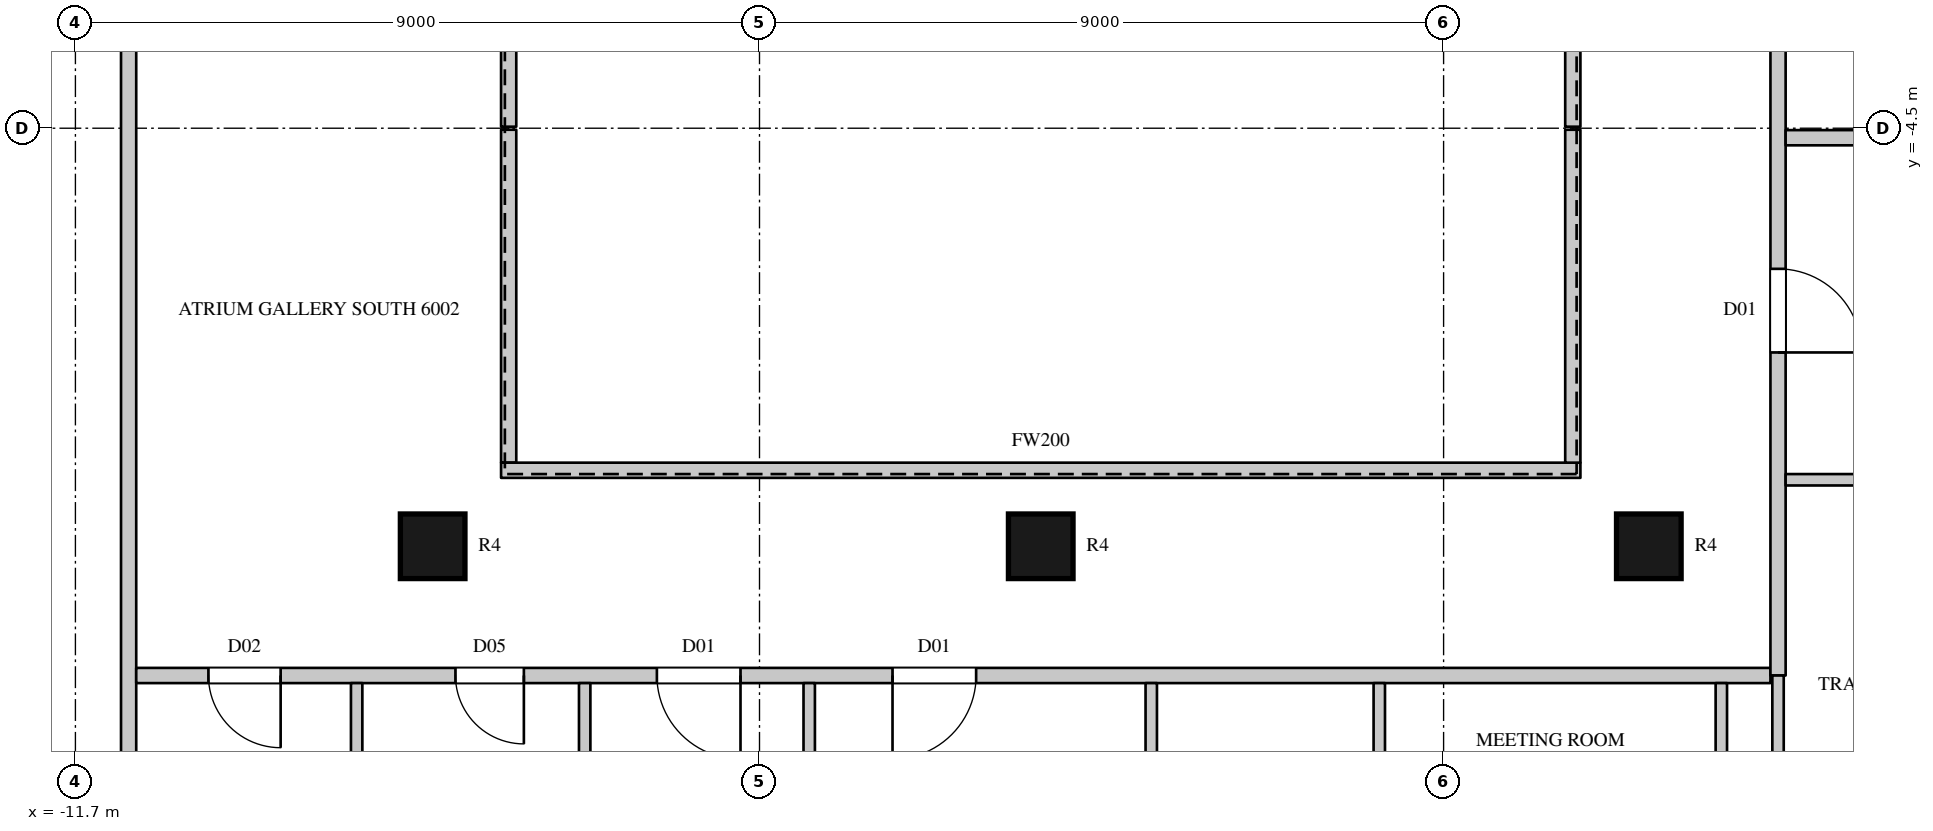
"""IFC4 building model, lengths in metres.
Left out: names, types, materials, properties, quantities, classifications, styles, units other than length and angle.
Written with IfcOpenShell. Run it as: python <this file> out.ifc"""

import sys

from ifc_helpers import new_model, si_unit, direction, frame, frame_2d, origin, origin_2d, place, context, subcontext, project, spatial, rectangle, circle, extrude, element, fill, save


model = new_model("IFC4")
c1 = context("Model", 3, precision=1e-05, world=origin(), true_north=direction((0.0, 1.0)))
c2 = subcontext(c1, "Body", "Model", "MODEL_VIEW")
j1 = project(units=[si_unit("LENGTHUNIT", "METRE"), si_unit("PLANEANGLEUNIT", "RADIAN")], contexts=[c1])
p1 = place(None, origin())
s1 = spatial("IfcSite", under=j1, at=p1, CompositionType="ELEMENT")
p2 = place(p1, origin())
s2 = spatial("IfcBuilding", under=s1, at=p2, CompositionType="ELEMENT")
p3 = place(p2, frame((0.0, 0.0, 268.0)))
s3 = spatial("IfcBuildingStorey", under=s2, at=p3, CompositionType="ELEMENT", Elevation=268.0)
for number, where, z_axis, x_axis in (
    (1, (-7.0, -10.0, 0.0), (0.0, 0.0, 1.0), (1.0, 0.0, 0.0)),
    (2, (1.0, -10.0, 0.0), (0.0, 0.0, 1.0), (1.0, 0.0, 0.0)),
    (3, (9.0, -10.0, 0.0), (0.0, 0.0, 1.0), (1.0, 0.0, 0.0)),
):
    element("IfcColumn", number, at=place(p3, frame(where, z_axis=z_axis, x_axis=x_axis)), inside=s3, PredefinedType="COLUMN", context=c2, shape_type="SweptSolid", body=[
        extrude(circle(Radius=0.425, at=origin_2d()), origin(), (0.0, 0.0, 1.0), 4.1),
    ])
p4 = place(p3, frame((-11.0, -14.8, 0.0), z_axis=(0.0, 0.0, 1.0), x_axis=(0.0, 1.0, 0.0)))
e4 = element("IfcWall", 4, at=p4, inside=s3, PredefinedType="PARTITIONING", context=c2, shape_type="SweptSolid", body=[
    extrude(rectangle(XDim=29.5, YDim=0.2, at=frame_2d((14.75, 0.0))), origin(), (0.0, 0.0, 1.0), 3.8),
])
p5 = place(p4, frame((17.9, 0.0, 0.0)))
e5 = element("IfcOpeningElement", 5, at=p5, cuts=e4, PredefinedType="OPENING", context=c2, shape_type="SweptSolid", body=[
    extrude(rectangle(XDim=1.5, YDim=2.4, at=frame_2d((0.75, 1.2))), frame((0.0, 0.11, 0.0), z_axis=(0.0, -1.0, 0.0), x_axis=(1.0, 0.0, 0.0)), (0.0, 0.0, 1.0), 0.22),
])
p6 = place(p3, frame((-10.9, -11.7, 0.0), z_axis=(0.0, 0.0, 1.0), x_axis=(1.0, 0.0, 0.0)))
e6 = element("IfcWall", 6, at=p6, inside=s3, PredefinedType="PARTITIONING", context=c2, shape_type="SweptSolid", body=[
    extrude(rectangle(XDim=21.5, YDim=0.2, at=frame_2d((10.75, 0.0))), origin(), (0.0, 0.0, 1.0), 3.8),
])
p7 = place(p6, frame((0.95, 0.0, 0.0)))
e7 = element("IfcOpeningElement", 7, at=p7, cuts=e6, PredefinedType="OPENING", context=c2, shape_type="SweptSolid", body=[
    extrude(rectangle(XDim=0.95, YDim=2.2, at=frame_2d((0.475, 1.1))), frame((0.0, 0.11, 0.0), z_axis=(0.0, -1.0, 0.0), x_axis=(1.0, 0.0, 0.0)), (0.0, 0.0, 1.0), 0.22),
])
p8 = place(p6, frame((4.2, 0.0, 0.0)))
e8 = element("IfcOpeningElement", 8, at=p8, cuts=e6, PredefinedType="OPENING", context=c2, shape_type="SweptSolid", body=[
    extrude(rectangle(XDim=0.9, YDim=2.2, at=frame_2d((0.45, 1.1))), frame((0.0, 0.11, 0.0), z_axis=(0.0, -1.0, 0.0), x_axis=(1.0, 0.0, 0.0)), (0.0, 0.0, 1.0), 0.22),
])
p9 = place(p6, frame((6.85, 0.0, 0.0)))
e9 = element("IfcOpeningElement", 9, at=p9, cuts=e6, PredefinedType="OPENING", context=c2, shape_type="SweptSolid", body=[
    extrude(rectangle(XDim=1.1, YDim=2.4, at=frame_2d((0.55, 1.2))), frame((0.0, 0.11, 0.0), z_axis=(0.0, -1.0, 0.0), x_axis=(1.0, 0.0, 0.0)), (0.0, 0.0, 1.0), 0.22),
])
p10 = place(p6, frame((9.95, 0.0, 0.0)))
e10 = element("IfcOpeningElement", 10, at=p10, cuts=e6, PredefinedType="OPENING", context=c2, shape_type="SweptSolid", body=[
    extrude(rectangle(XDim=1.1, YDim=2.4, at=frame_2d((0.55, 1.2))), frame((0.0, 0.11, 0.0), z_axis=(0.0, -1.0, 0.0), x_axis=(1.0, 0.0, 0.0)), (0.0, 0.0, 1.0), 0.22),
])
p11 = place(p3, frame((-6.0, -8.9, 0.0), z_axis=(0.0, 0.0, 1.0), x_axis=(0.0, 1.0, 0.0)))
e11 = element("IfcWall", 11, at=p11, inside=s3, PredefinedType="PARTITIONING", context=c2, shape_type="SweptSolid", body=[
    extrude(rectangle(XDim=4.38, YDim=0.2, at=frame_2d((2.19, 0.0))), origin(), (0.0, 0.0, 1.0), 3.8),
])
p12 = place(p3, frame((-6.1, -9.0, 0.0), z_axis=(0.0, 0.0, 1.0), x_axis=(1.0, 0.0, 0.0)))
e12 = element("IfcWall", 12, at=p12, inside=s3, PredefinedType="PARTITIONING", context=c2, shape_type="SweptSolid", body=[
    extrude(rectangle(XDim=14.2, YDim=0.2, at=frame_2d((7.1, 0.0))), origin(), (0.0, 0.0, 1.0), 3.8),
])
p13 = place(p3, frame((-6.0, -4.48, 0.0), z_axis=(0.0, 0.0, 1.0), x_axis=(0.0, 1.0, 0.0)))
e13 = element("IfcWall", 13, at=p13, inside=s3, PredefinedType="PARTITIONING", context=c2, shape_type="SweptSolid", body=[
    extrude(rectangle(XDim=13.38, YDim=0.2, at=frame_2d((6.69, 0.0))), origin(), (0.0, 0.0, 1.0), 3.8),
])
p14 = place(p3, frame((8.0, -8.9, 0.0), z_axis=(0.0, 0.0, 1.0), x_axis=(0.0, 1.0, 0.0)))
e14 = element("IfcWall", 14, at=p14, inside=s3, PredefinedType="PARTITIONING", context=c2, shape_type="SweptSolid", body=[
    extrude(rectangle(XDim=4.38, YDim=0.2, at=frame_2d((2.19, 0.0))), origin(), (0.0, 0.0, 1.0), 3.8),
])
p15 = place(p3, frame((8.0, -4.48, 0.0), z_axis=(0.0, 0.0, 1.0), x_axis=(0.0, 1.0, 0.0)))
e15 = element("IfcWall", 15, at=p15, inside=s3, PredefinedType="PARTITIONING", context=c2, shape_type="SweptSolid", body=[
    extrude(rectangle(XDim=13.38, YDim=0.2, at=frame_2d((6.69, 0.0))), origin(), (0.0, 0.0, 1.0), 3.8),
])
p16 = place(p3, frame((10.7, -11.7, 0.0), z_axis=(0.0, 0.0, 1.0), x_axis=(0.0, 1.0, 0.0)))
e16 = element("IfcWall", 16, at=p16, inside=s3, PredefinedType="PARTITIONING", context=c2, shape_type="SweptSolid", body=[
    extrude(rectangle(XDim=23.8, YDim=0.2, at=frame_2d((11.9, 0.0))), origin(), (0.0, 0.0, 1.0), 3.8),
])
p17 = place(p16, frame((12.35, 0.0, 0.0)))
e17 = element("IfcOpeningElement", 17, at=p17, cuts=e16, PredefinedType="OPENING", context=c2, shape_type="SweptSolid", body=[
    extrude(rectangle(XDim=1.5, YDim=2.4, at=frame_2d((0.75, 1.2))), frame((0.0, 0.11, 0.0), z_axis=(0.0, -1.0, 0.0), x_axis=(1.0, 0.0, 0.0)), (0.0, 0.0, 1.0), 0.22),
])
p18 = place(p16, frame((19.55, 0.0, 0.0)))
e18 = element("IfcOpeningElement", 18, at=p18, cuts=e16, PredefinedType="OPENING", context=c2, shape_type="SweptSolid", body=[
    extrude(rectangle(XDim=1.1, YDim=2.4, at=frame_2d((0.55, 1.2))), frame((0.0, 0.11, 0.0), z_axis=(0.0, -1.0, 0.0), x_axis=(1.0, 0.0, 0.0)), (0.0, 0.0, 1.0), 0.22),
])
p19 = place(p16, frame((4.25, 0.0, 0.0)))
e19 = element("IfcOpeningElement", 19, at=p19, cuts=e16, PredefinedType="OPENING", context=c2, shape_type="SweptSolid", body=[
    extrude(rectangle(XDim=1.1, YDim=2.4, at=frame_2d((0.55, 1.2))), frame((0.0, 0.11, 0.0), z_axis=(0.0, -1.0, 0.0), x_axis=(1.0, 0.0, 0.0)), (0.0, 0.0, 1.0), 0.22),
])
p20 = place(p3, frame((10.8, -4.625, 0.0), z_axis=(0.0, 0.0, 1.0), x_axis=(1.0, 0.0, 0.0)))
e20 = element("IfcWall", 20, at=p20, inside=s3, PredefinedType="PARTITIONING", context=c2, shape_type="SweptSolid", body=[
    extrude(rectangle(XDim=3.875, YDim=0.2, at=frame_2d((1.938, 0.0))), origin(), (0.0, 0.0, 1.0), 3.8),
])
for number, where, z_axis, x_axis in (
    (21, (-8.0, -24.04, 0.0), (0.0, 0.0, 1.0), (0.0, 1.0, 0.0)),
    (22, (-5.0, -24.04, 0.0), (0.0, 0.0, 1.0), (0.0, 1.0, 0.0)),
):
    element("IfcWall", number, at=place(p3, frame(where, z_axis=z_axis, x_axis=x_axis)), inside=s3, PredefinedType="PARTITIONING", context=c2, shape_type="SweptSolid", body=[
        extrude(rectangle(XDim=12.24, YDim=0.15, at=frame_2d((6.12, 0.0))), origin(), (0.0, 0.0, 1.0), 3.8),
    ])
p21 = place(p3, frame((-2.046, -23.441, 0.0), z_axis=(0.0, 0.0, 1.0), x_axis=(0.0, 1.0, 0.0)))
e23 = element("IfcWall", 23, at=p21, inside=s3, PredefinedType="PARTITIONING", context=c2, shape_type="SweptSolid", body=[
    extrude(rectangle(XDim=11.641, YDim=0.15, at=frame_2d((5.821, 0.0))), origin(), (0.0, 0.0, 1.0), 3.8),
])
p22 = place(p3, frame((2.454, -15.525, 0.0), z_axis=(0.0, 0.0, 1.0), x_axis=(0.0, 1.0, 0.0)))
e24 = element("IfcWall", 24, at=p22, inside=s3, PredefinedType="PARTITIONING", context=c2, shape_type="SweptSolid", body=[
    extrude(rectangle(XDim=3.725, YDim=0.15, at=frame_2d((1.862, 0.0))), origin(), (0.0, 0.0, 1.0), 3.8),
])
p23 = place(p22, frame((1.4, 0.0, 0.0)))
e25 = element("IfcOpeningElement", 25, at=p23, cuts=e24, PredefinedType="OPENING", context=c2, shape_type="SweptSolid", body=[
    extrude(rectangle(XDim=0.95, YDim=2.2, at=frame_2d((0.475, 1.1))), frame((0.0, 0.085, 0.0), z_axis=(0.0, -1.0, 0.0), x_axis=(1.0, 0.0, 0.0)), (0.0, 0.0, 1.0), 0.17),
])
for number, where, z_axis, x_axis in (
    (26, (5.454, -15.525, 0.0), (0.0, 0.0, 1.0), (0.0, 1.0, 0.0)),
    (27, (9.954, -15.525, 0.0), (0.0, 0.0, 1.0), (0.0, 1.0, 0.0)),
):
    element("IfcWall", number, at=place(p3, frame(where, z_axis=z_axis, x_axis=x_axis)), inside=s3, PredefinedType="PARTITIONING", context=c2, shape_type="SweptSolid", body=[
        extrude(rectangle(XDim=3.725, YDim=0.15, at=frame_2d((1.862, 0.0))), origin(), (0.0, 0.0, 1.0), 3.8),
    ])
p24 = place(p3, frame((10.7, -20.828, 0.0), z_axis=(0.0, 0.0, 1.0), x_axis=(0.0, 1.0, 0.0)))
e28 = element("IfcWall", 28, at=p24, inside=s3, PredefinedType="PARTITIONING", context=c2, shape_type="SweptSolid", body=[
    extrude(rectangle(XDim=9.128, YDim=0.15, at=frame_2d((4.564, 0.0))), origin(), (0.0, 0.0, 1.0), 3.8),
])
p25 = place(p3, frame((10.8, -9.125, 0.0), z_axis=(0.0, 0.0, 1.0), x_axis=(1.0, 0.0, 0.0)))
e29 = element("IfcWall", 29, at=p25, inside=s3, PredefinedType="PARTITIONING", context=c2, shape_type="SweptSolid", body=[
    extrude(rectangle(XDim=3.875, YDim=0.15, at=frame_2d((1.938, 0.0))), origin(), (0.0, 0.0, 1.0), 3.8),
])
p26 = place(p25, frame((2.65, 0.0, 0.0)))
e30 = element("IfcOpeningElement", 30, at=p26, cuts=e29, PredefinedType="OPENING", context=c2, shape_type="SweptSolid", body=[
    extrude(rectangle(XDim=0.95, YDim=2.2, at=frame_2d((0.475, 1.1))), frame((0.0, 0.085, 0.0), z_axis=(0.0, -1.0, 0.0), x_axis=(1.0, 0.0, 0.0)), (0.0, 0.0, 1.0), 0.17),
])
p27 = place(p7, origin())
e31 = element("IfcDoor", 31, at=p27, inside=s3, OperationType="SINGLE_SWING_LEFT", PredefinedType="DOOR", context=c2, shape_type="SweptSolid", body=[
    extrude(rectangle(XDim=0.95, YDim=2.2, at=frame_2d((0.475, 1.1))), frame((0.0, 0.025, 0.0), z_axis=(0.0, -1.0, 0.0), x_axis=(1.0, 0.0, 0.0)), (0.0, 0.0, 1.0), 0.05),
])
fill(e7, e31)
p28 = place(p8, origin())
e32 = element("IfcDoor", 32, at=p28, inside=s3, OperationType="SINGLE_SWING_LEFT", PredefinedType="DOOR", context=c2, shape_type="SweptSolid", body=[
    extrude(rectangle(XDim=0.9, YDim=2.2, at=frame_2d((0.45, 1.1))), frame((0.0, 0.025, 0.0), z_axis=(0.0, -1.0, 0.0), x_axis=(1.0, 0.0, 0.0)), (0.0, 0.0, 1.0), 0.05),
])
fill(e8, e32)
p29 = place(p9, origin())
e33 = element("IfcDoor", 33, at=p29, inside=s3, OperationType="SINGLE_SWING_LEFT", PredefinedType="DOOR", context=c2, shape_type="SweptSolid", body=[
    extrude(rectangle(XDim=1.1, YDim=2.4, at=frame_2d((0.55, 1.2))), frame((0.0, 0.025, 0.0), z_axis=(0.0, -1.0, 0.0), x_axis=(1.0, 0.0, 0.0)), (0.0, 0.0, 1.0), 0.05),
])
fill(e9, e33)
p30 = place(p10, origin())
e34 = element("IfcDoor", 34, at=p30, inside=s3, OperationType="SINGLE_SWING_RIGHT", PredefinedType="DOOR", context=c2, shape_type="SweptSolid", body=[
    extrude(rectangle(XDim=1.1, YDim=2.4, at=frame_2d((0.55, 1.2))), frame((0.0, 0.025, 0.0), z_axis=(0.0, -1.0, 0.0), x_axis=(1.0, 0.0, 0.0)), (0.0, 0.0, 1.0), 0.05),
])
fill(e10, e34)
p31 = place(p19, origin())
e35 = element("IfcDoor", 35, at=p31, inside=s3, OperationType="SINGLE_SWING_RIGHT", PredefinedType="DOOR", context=c2, shape_type="SweptSolid", body=[
    extrude(rectangle(XDim=1.1, YDim=2.4, at=frame_2d((0.55, 1.2))), frame((0.0, 0.025, 0.0), z_axis=(0.0, -1.0, 0.0), x_axis=(1.0, 0.0, 0.0)), (0.0, 0.0, 1.0), 0.05),
])
fill(e19, e35)
save(model, sys.argv[1])
